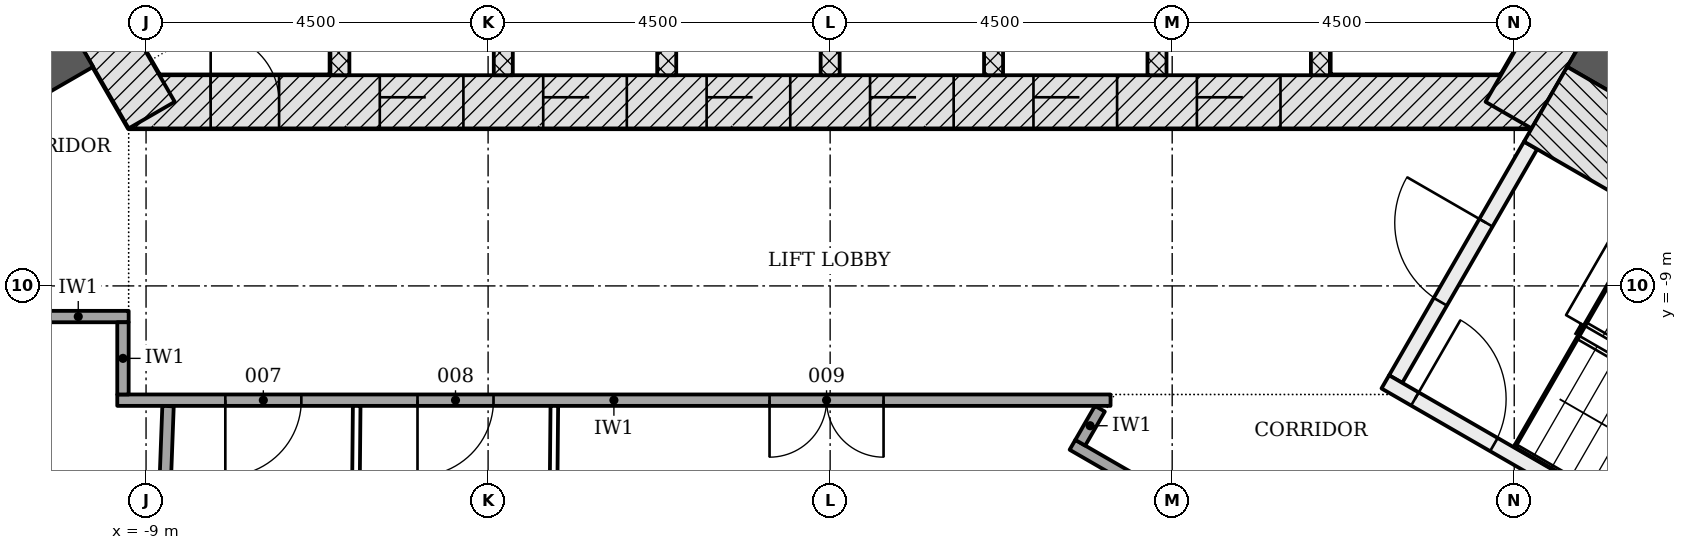
"""IFC4 building model, lengths in metres.
Left out: names, types, materials, properties, quantities, classifications, styles, units other than length and angle.
Written with IfcOpenShell. Run it as: python <this file> out.ifc"""

import sys

from ifc_helpers import new_model, si_unit, direction, frame, frame_2d, origin, place, context, subcontext, project, spatial, rectangle, extrude, element, fill, save


model = new_model("IFC4")
c1 = context("Model", 3, precision=1e-05, world=origin(), true_north=direction((0.0, 1.0)))
c2 = subcontext(c1, "Body", "Model", "MODEL_VIEW")
j1 = project(units=[si_unit("LENGTHUNIT", "METRE"), si_unit("PLANEANGLEUNIT", "RADIAN")], contexts=[c1])
p1 = place(None, origin())
s1 = spatial("IfcSite", under=j1, at=p1, CompositionType="ELEMENT")
p2 = place(p1, origin())
s2 = spatial("IfcBuilding", under=s1, at=p2, CompositionType="ELEMENT")
p3 = place(p2, frame((0.0, 0.0, 27.6)))
s3 = spatial("IfcBuildingStorey", under=s2, at=p3, CompositionType="ELEMENT", Elevation=27.6)
p4 = place(p3, frame((-9.229, -6.578, -0.2), z_axis=(0.0, 0.0, 1.0), x_axis=(1.0, 0.0, 0.0)))
e1 = element("IfcWall", 1, at=p4, inside=s3, PredefinedType="SHEAR", context=c2, shape_type="SweptSolid", body=[
    extrude(rectangle(XDim=18.458, YDim=0.7, at=frame_2d((9.229, 0.0))), origin(), (0.0, 0.0, 1.0), 3.6),
])
p5 = place(p4, frame((3.304, 0.0, 0.2)))
e2 = element("IfcOpeningElement", 2, at=p5, cuts=e1, PredefinedType="OPENING", context=c2, shape_type="SweptSolid", body=[
    extrude(rectangle(XDim=1.1, YDim=2.1, at=frame_2d((0.55, 1.05))), frame((0.0, 0.36, 0.0), z_axis=(0.0, -1.0, 0.0), x_axis=(1.0, 0.0, 0.0)), (0.0, 0.0, 1.0), 0.72),
])
p6 = place(p4, frame((5.454, 0.0, 0.2)))
e3 = element("IfcOpeningElement", 3, at=p6, cuts=e1, PredefinedType="OPENING", context=c2, shape_type="SweptSolid", body=[
    extrude(rectangle(XDim=1.1, YDim=2.1, at=frame_2d((0.55, 1.05))), frame((0.0, 0.36, 0.0), z_axis=(0.0, -1.0, 0.0), x_axis=(1.0, 0.0, 0.0)), (0.0, 0.0, 1.0), 0.72),
])
p7 = place(p4, frame((7.604, 0.0, 0.2)))
e4 = element("IfcOpeningElement", 4, at=p7, cuts=e1, PredefinedType="OPENING", context=c2, shape_type="SweptSolid", body=[
    extrude(rectangle(XDim=1.1, YDim=2.1, at=frame_2d((0.55, 1.05))), frame((0.0, 0.36, 0.0), z_axis=(0.0, -1.0, 0.0), x_axis=(1.0, 0.0, 0.0)), (0.0, 0.0, 1.0), 0.72),
])
p8 = place(p4, frame((9.754, 0.0, 0.2)))
e5 = element("IfcOpeningElement", 5, at=p8, cuts=e1, PredefinedType="OPENING", context=c2, shape_type="SweptSolid", body=[
    extrude(rectangle(XDim=1.1, YDim=2.1, at=frame_2d((0.55, 1.05))), frame((0.0, 0.36, 0.0), z_axis=(0.0, -1.0, 0.0), x_axis=(1.0, 0.0, 0.0)), (0.0, 0.0, 1.0), 0.72),
])
p9 = place(p4, frame((11.904, 0.0, 0.2)))
e6 = element("IfcOpeningElement", 6, at=p9, cuts=e1, PredefinedType="OPENING", context=c2, shape_type="SweptSolid", body=[
    extrude(rectangle(XDim=1.1, YDim=2.1, at=frame_2d((0.55, 1.05))), frame((0.0, 0.36, 0.0), z_axis=(0.0, -1.0, 0.0), x_axis=(1.0, 0.0, 0.0)), (0.0, 0.0, 1.0), 0.72),
])
p10 = place(p4, frame((14.054, 0.0, 0.2)))
e7 = element("IfcOpeningElement", 7, at=p10, cuts=e1, PredefinedType="OPENING", context=c2, shape_type="SweptSolid", body=[
    extrude(rectangle(XDim=1.1, YDim=2.1, at=frame_2d((0.55, 1.05))), frame((0.0, 0.36, 0.0), z_axis=(0.0, -1.0, 0.0), x_axis=(1.0, 0.0, 0.0)), (0.0, 0.0, 1.0), 0.72),
])
p11 = place(p4, frame((1.079, 0.0, 0.2)))
e8 = element("IfcOpeningElement", 8, at=p11, cuts=e1, PredefinedType="OPENING", context=c2, shape_type="SweptSolid", body=[
    extrude(rectangle(XDim=0.9, YDim=2.1, at=frame_2d((0.45, 1.05))), frame((0.0, 0.36, 0.0), z_axis=(0.0, -1.0, 0.0), x_axis=(1.0, 0.0, 0.0)), (0.0, 0.0, 1.0), 0.72),
])
for number, where, z_axis, x_axis in (
    (9, (8.926, -6.753, -0.2), (0.0, 0.0, 1.0), (0.5, 0.866, 0.0)),
    (10, (-10.311, -4.353, -0.2), (0.0, 0.0, 1.0), (0.5, -0.866, 0.0)),
):
    element("IfcWall", number, at=place(p3, frame(where, z_axis=z_axis, x_axis=x_axis)), inside=s3, PredefinedType="SHEAR", context=c2, shape_type="SweptSolid", body=[
        extrude(rectangle(XDim=2.771, YDim=0.7, at=frame_2d((1.386, 0.0))), origin(), (0.0, 0.0, 1.0), 3.6),
    ])
for number, where, z_axis, x_axis in (
    (11, (-9.922, -5.728, -0.2), (0.0, 0.0, 1.0), (-0.866, -0.5, 0.0)),
    (12, (9.922, -5.728, -0.2), (0.0, 0.0, 1.0), (0.866, -0.5, 0.0)),
):
    element("IfcWall", number, at=place(p3, frame(where, z_axis=z_axis, x_axis=x_axis)), inside=s3, PredefinedType="SHEAR", context=c2, shape_type="SweptSolid", body=[
        extrude(rectangle(XDim=14.633, YDim=0.9, at=frame_2d((7.316, 0.0))), origin(), (0.0, 0.0, 1.0), 3.6),
    ])
for number, where, z_axis, x_axis in (
    (13, (-6.45, -6.228, -0.2), (0.0, 0.0, 1.0), (0.0, 1.0, 0.0)),
    (14, (-4.3, -6.228, -0.2), (0.0, 0.0, 1.0), (0.0, 1.0, 0.0)),
    (15, (-2.15, -6.228, -0.2), (0.0, 0.0, 1.0), (0.0, 1.0, 0.0)),
    (16, (0.0, -6.228, -0.2), (0.0, 0.0, 1.0), (0.0, 1.0, 0.0)),
    (17, (2.15, -6.228, -0.2), (0.0, 0.0, 1.0), (0.0, 1.0, 0.0)),
    (18, (4.3, -6.228, -0.2), (0.0, 0.0, 1.0), (0.0, 1.0, 0.0)),
    (19, (6.45, -6.228, -0.2), (0.0, 0.0, 1.0), (0.0, 1.0, 0.0)),
):
    element("IfcWall", number, at=place(p3, frame(where, z_axis=z_axis, x_axis=x_axis)), inside=s3, PredefinedType="PARTITIONING", context=c2, shape_type="SweptSolid", body=[
        extrude(rectangle(XDim=2.5, YDim=0.25, at=frame_2d((1.25, 0.0))), origin(), (0.0, 0.0, 1.0), 3.6),
    ])
p12 = place(p3, frame((-10.43, -4.847, -0.2), z_axis=(0.0, 0.0, 1.0), x_axis=(-0.866018442252, -0.500012057535, 0.0)))
e20 = element("IfcWall", 20, at=p12, inside=s3, PredefinedType="SHEAR", context=c2, shape_type="SweptSolid", body=[
    extrude(rectangle(XDim=7.2, YDim=1.136, at=frame_2d((3.6, 0.0))), origin(), (0.0, 0.0, 1.0), 3.6),
])
p13 = place(p3, frame((7.44, -10.226, -0.2), z_axis=(0.0, 0.0, 1.0), x_axis=(0.500022077904, 0.866012656725, 0.0)))
e21 = element("IfcWall", 21, at=p13, inside=s3, PredefinedType="SHEAR", context=c2, shape_type="SweptSolid", body=[
    extrude(rectangle(XDim=3.55, YDim=0.2, at=frame_2d((1.775, 0.0))), origin(), (0.0, 0.0, 1.0), 3.6),
])
p14 = place(p13, frame((1.175, 0.0, 0.2)))
e22 = element("IfcOpeningElement", 22, at=p14, cuts=e21, PredefinedType="OPENING", context=c2, shape_type="SweptSolid", body=[
    extrude(rectangle(XDim=1.2, YDim=2.1, at=frame_2d((0.6, 1.05))), frame((0.0, 0.11, 0.0), z_axis=(0.0, -1.0, 0.0), x_axis=(1.0, 0.0, 0.0)), (0.0, 0.0, 1.0), 0.22),
])
p15 = place(p3, frame((7.304, -10.262, -0.2), z_axis=(0.0, 0.0, 1.0), x_axis=(0.866026594901, -0.49999793692, 0.0)))
e23 = element("IfcWall", 23, at=p15, inside=s3, PredefinedType="SHEAR", context=c2, shape_type="SweptSolid", body=[
    extrude(rectangle(XDim=5.6, YDim=0.2, at=frame_2d((2.8, 0.0))), origin(), (0.0, 0.0, 1.0), 3.6),
])
p16 = place(p15, frame((0.45, 0.0, 0.2)))
e24 = element("IfcOpeningElement", 24, at=p16, cuts=e23, PredefinedType="OPENING", context=c2, shape_type="SweptSolid", body=[
    extrude(rectangle(XDim=1.2, YDim=2.1, at=frame_2d((0.6, 1.05))), frame((0.0, 0.11, 0.0), z_axis=(0.0, -1.0, 0.0), x_axis=(1.0, 0.0, 0.0)), (0.0, 0.0, 1.0), 0.22),
])
p17 = place(p3, frame((9.413, -6.61, -0.2), z_axis=(0.0, 0.0, 1.0), x_axis=(0.866018442252, -0.500012057535, 0.0)))
e25 = element("IfcWall", 25, at=p17, inside=s3, PredefinedType="SHEAR", context=c2, shape_type="SweptSolid", body=[
    extrude(rectangle(XDim=7.2, YDim=1.136, at=frame_2d((3.6, 0.0))), origin(), (0.0, 0.0, 1.0), 3.6),
])
p18 = place(p3, frame((3.689, -10.503, 0.0), z_axis=(0.0, 0.0, 1.0), x_axis=(-1.0, 0.0, 0.0)))
e26 = element("IfcWall", 26, at=p18, inside=s3, PredefinedType="PARTITIONING", context=c2, shape_type="SweptSolid", body=[
    extrude(rectangle(XDim=13.068, YDim=0.15, at=frame_2d((6.534, 0.0))), origin(), (0.0, 0.0, 1.0), 2.768),
])
p19 = place(p18, frame((10.646, 0.0, 0.0)))
e27 = element("IfcOpeningElement", 27, at=p19, cuts=e26, PredefinedType="OPENING", context=c2, shape_type="SweptSolid", body=[
    extrude(rectangle(XDim=1.0, YDim=2.1, at=frame_2d((0.5, 1.05))), frame((0.0, 0.085, 0.0), z_axis=(0.0, -1.0, 0.0), x_axis=(1.0, 0.0, 0.0)), (0.0, 0.0, 1.0), 0.17),
])
p20 = place(p18, frame((8.118, 0.0, 0.0)))
e28 = element("IfcOpeningElement", 28, at=p20, cuts=e26, PredefinedType="OPENING", context=c2, shape_type="SweptSolid", body=[
    extrude(rectangle(XDim=1.0, YDim=2.1, at=frame_2d((0.5, 1.05))), frame((0.0, 0.085, 0.0), z_axis=(0.0, -1.0, 0.0), x_axis=(1.0, 0.0, 0.0)), (0.0, 0.0, 1.0), 0.17),
])
p21 = place(p18, frame((2.986, 0.0, 0.0)))
e29 = element("IfcOpeningElement", 29, at=p21, cuts=e26, PredefinedType="OPENING", context=c2, shape_type="SweptSolid", body=[
    extrude(rectangle(XDim=1.5, YDim=2.1, at=frame_2d((0.75, 1.05))), frame((0.0, 0.085, 0.0), z_axis=(0.0, -1.0, 0.0), x_axis=(1.0, 0.0, 0.0)), (0.0, 0.0, 1.0), 0.17),
])
p22 = place(p3, frame((8.341, -14.066, 0.0), z_axis=(0.0, 0.0, 1.0), x_axis=(-0.866017493347, 0.500013701029, 0.0)))
e30 = element("IfcWall", 30, at=p22, inside=s3, PredefinedType="PARTITIONING", context=c2, shape_type="SweptSolid", body=[
    extrude(rectangle(XDim=5.95, YDim=0.15, at=frame_2d((2.975, 0.0))), origin(), (0.0, 0.0, 1.0), 2.768),
])
p23 = place(p22, frame((1.557, 0.0, 0.0)))
e31 = element("IfcOpeningElement", 31, at=p23, cuts=e30, PredefinedType="OPENING", context=c2, shape_type="SweptSolid", body=[
    extrude(rectangle(XDim=1.5, YDim=2.1, at=frame_2d((0.75, 1.05))), frame((0.0, 0.085, 0.0), z_axis=(0.0, -1.0, 0.0), x_axis=(1.0, 0.0, 0.0)), (0.0, 0.0, 1.0), 0.17),
])
p24 = place(p3, frame((-10.555, -9.403, 0.0), z_axis=(0.0, 0.0, 1.0), x_axis=(1.0, 0.0, 0.0)))
e32 = element("IfcWall", 32, at=p24, inside=s3, PredefinedType="PARTITIONING", context=c2, shape_type="SweptSolid", body=[
    extrude(rectangle(XDim=1.326, YDim=0.15, at=frame_2d((0.663, 0.0))), origin(), (0.0, 0.0, 1.0), 3.4),
])
p25 = place(p3, frame((-9.304, -10.428, 0.0), z_axis=(0.0, 0.0, 1.0), x_axis=(0.0, 1.0, 0.0)))
e33 = element("IfcWall", 33, at=p25, inside=s3, PredefinedType="PARTITIONING", context=c2, shape_type="SweptSolid", body=[
    extrude(rectangle(XDim=0.95, YDim=0.15, at=frame_2d((0.475, 0.0))), origin(), (0.0, 0.0, 1.0), 3.4),
])
p26 = place(p3, frame((3.291, -11.063, 0.0), z_axis=(0.0, 0.0, 1.0), x_axis=(0.499899694197, 0.866083307622, 0.0)))
e34 = element("IfcWall", 34, at=p26, inside=s3, PredefinedType="PARTITIONING", context=c2, shape_type="SweptSolid", body=[
    extrude(rectangle(XDim=0.517, YDim=0.15, at=frame_2d((0.258, 0.0))), origin(), (0.0, 0.0, 1.0), 3.4),
])
p27 = place(p3, frame((-8.968, -17.517, 0.0), z_axis=(0.0, 0.0, 1.0), x_axis=(0.037111842783, 0.999311118284, 0.0)))
e35 = element("IfcWall", 35, at=p27, inside=s3, PredefinedType="PARTITIONING", context=c2, shape_type="SweptSolid", body=[
    extrude(rectangle(XDim=6.94, YDim=0.15, at=frame_2d((3.47, 0.0))), origin(), (0.0, 0.0, 1.0), 2.768),
])
p28 = place(p3, frame((-3.649, -12.762, 0.0), z_axis=(0.0, 0.0, 1.0), x_axis=(0.009279564663, 0.999956943913, 0.0)))
e36 = element("IfcWall", 36, at=p28, inside=s3, PredefinedType="PARTITIONING", context=c2, shape_type="SweptSolid", body=[
    extrude(rectangle(XDim=2.184, YDim=0.1, at=frame_2d((1.092, 0.0))), origin(), (0.0, 0.0, 1.0), 3.4),
])
p29 = place(p3, frame((-6.249, -12.738, 0.0), z_axis=(0.0, 0.0, 1.0), x_axis=(0.009270376076, 0.99995702914, 0.0)))
e37 = element("IfcWall", 37, at=p29, inside=s3, PredefinedType="PARTITIONING", context=c2, shape_type="SweptSolid", body=[
    extrude(rectangle(XDim=2.159, YDim=0.1, at=frame_2d((1.08, 0.0))), origin(), (0.0, 0.0, 1.0), 3.4),
])
p30 = place(p5, origin())
e38 = element("IfcDoor", 38, at=p30, inside=s3, OperationType="DOUBLE_DOOR_SLIDING", PredefinedType="DOOR", context=c2, shape_type="SweptSolid", body=[
    extrude(rectangle(XDim=1.1, YDim=2.1, at=frame_2d((0.55, 1.05))), frame((0.0, 0.025, 0.0), z_axis=(0.0, -1.0, 0.0), x_axis=(1.0, 0.0, 0.0)), (0.0, 0.0, 1.0), 0.05),
])
fill(e2, e38)
p31 = place(p6, origin())
e39 = element("IfcDoor", 39, at=p31, inside=s3, OperationType="DOUBLE_DOOR_SLIDING", PredefinedType="DOOR", context=c2, shape_type="SweptSolid", body=[
    extrude(rectangle(XDim=1.1, YDim=2.1, at=frame_2d((0.55, 1.05))), frame((0.0, 0.025, 0.0), z_axis=(0.0, -1.0, 0.0), x_axis=(1.0, 0.0, 0.0)), (0.0, 0.0, 1.0), 0.05),
])
fill(e3, e39)
p32 = place(p7, origin())
e40 = element("IfcDoor", 40, at=p32, inside=s3, OperationType="DOUBLE_DOOR_SLIDING", PredefinedType="DOOR", context=c2, shape_type="SweptSolid", body=[
    extrude(rectangle(XDim=1.1, YDim=2.1, at=frame_2d((0.55, 1.05))), frame((0.0, 0.025, 0.0), z_axis=(0.0, -1.0, 0.0), x_axis=(1.0, 0.0, 0.0)), (0.0, 0.0, 1.0), 0.05),
])
fill(e4, e40)
p33 = place(p8, origin())
e41 = element("IfcDoor", 41, at=p33, inside=s3, OperationType="DOUBLE_DOOR_SLIDING", PredefinedType="DOOR", context=c2, shape_type="SweptSolid", body=[
    extrude(rectangle(XDim=1.1, YDim=2.1, at=frame_2d((0.55, 1.05))), frame((0.0, 0.025, 0.0), z_axis=(0.0, -1.0, 0.0), x_axis=(1.0, 0.0, 0.0)), (0.0, 0.0, 1.0), 0.05),
])
fill(e5, e41)
p34 = place(p9, origin())
e42 = element("IfcDoor", 42, at=p34, inside=s3, OperationType="DOUBLE_DOOR_SLIDING", PredefinedType="DOOR", context=c2, shape_type="SweptSolid", body=[
    extrude(rectangle(XDim=1.1, YDim=2.1, at=frame_2d((0.55, 1.05))), frame((0.0, 0.025, 0.0), z_axis=(0.0, -1.0, 0.0), x_axis=(1.0, 0.0, 0.0)), (0.0, 0.0, 1.0), 0.05),
])
fill(e6, e42)
p35 = place(p10, origin())
e43 = element("IfcDoor", 43, at=p35, inside=s3, OperationType="DOUBLE_DOOR_SLIDING", PredefinedType="DOOR", context=c2, shape_type="SweptSolid", body=[
    extrude(rectangle(XDim=1.1, YDim=2.1, at=frame_2d((0.55, 1.05))), frame((0.0, 0.025, 0.0), z_axis=(0.0, -1.0, 0.0), x_axis=(1.0, 0.0, 0.0)), (0.0, 0.0, 1.0), 0.05),
])
fill(e7, e43)
p36 = place(p11, origin())
e44 = element("IfcDoor", 44, at=p36, inside=s3, OperationType="SINGLE_SWING_LEFT", PredefinedType="DOOR", context=c2, shape_type="SweptSolid", body=[
    extrude(rectangle(XDim=0.9, YDim=2.1, at=frame_2d((0.45, 1.05))), frame((0.0, 0.075, 0.0), z_axis=(0.0, -1.0, 0.0), x_axis=(1.0, 0.0, 0.0)), (0.0, 0.0, 1.0), 0.15),
])
fill(e8, e44)
p37 = place(p14, origin())
e45 = element("IfcDoor", 45, at=p37, inside=s3, OperationType="SINGLE_SWING_RIGHT", PredefinedType="DOOR", context=c2, shape_type="SweptSolid", body=[
    extrude(rectangle(XDim=1.2, YDim=2.1, at=frame_2d((0.6, 1.05))), frame((0.0, 0.025, 0.0), z_axis=(0.0, -1.0, 0.0), x_axis=(1.0, 0.0, 0.0)), (0.0, 0.0, 1.0), 0.05),
])
fill(e22, e45)
p38 = place(p16, origin())
e46 = element("IfcDoor", 46, at=p38, inside=s3, OperationType="SINGLE_SWING_LEFT", PredefinedType="DOOR", context=c2, shape_type="SweptSolid", body=[
    extrude(rectangle(XDim=1.2, YDim=2.1, at=frame_2d((0.6, 1.05))), frame((0.0, 0.025, 0.0), z_axis=(0.0, -1.0, 0.0), x_axis=(1.0, 0.0, 0.0)), (0.0, 0.0, 1.0), 0.05),
])
fill(e24, e46)
p39 = place(p19, origin())
e47 = element("IfcDoor", 47, at=p39, inside=s3, OperationType="SINGLE_SWING_RIGHT", PredefinedType="DOOR", context=c2, shape_type="SweptSolid", body=[
    extrude(rectangle(XDim=1.0, YDim=2.1, at=frame_2d((0.5, 1.05))), frame((0.0, 0.025, 0.0), z_axis=(0.0, -1.0, 0.0), x_axis=(1.0, 0.0, 0.0)), (0.0, 0.0, 1.0), 0.05),
])
fill(e27, e47)
p40 = place(p20, origin())
e48 = element("IfcDoor", 48, at=p40, inside=s3, OperationType="SINGLE_SWING_RIGHT", PredefinedType="DOOR", context=c2, shape_type="SweptSolid", body=[
    extrude(rectangle(XDim=1.0, YDim=2.1, at=frame_2d((0.5, 1.05))), frame((0.0, 0.025, 0.0), z_axis=(0.0, -1.0, 0.0), x_axis=(1.0, 0.0, 0.0)), (0.0, 0.0, 1.0), 0.05),
])
fill(e28, e48)
p41 = place(p21, origin())
e49 = element("IfcDoor", 49, at=p41, inside=s3, OperationType="DOUBLE_DOOR_SINGLE_SWING", PredefinedType="DOOR", context=c2, shape_type="SweptSolid", body=[
    extrude(rectangle(XDim=1.5, YDim=2.1, at=frame_2d((0.75, 1.05))), frame((0.0, 0.025, 0.0), z_axis=(0.0, -1.0, 0.0), x_axis=(1.0, 0.0, 0.0)), (0.0, 0.0, 1.0), 0.05),
])
fill(e29, e49)
save(model, sys.argv[1])
